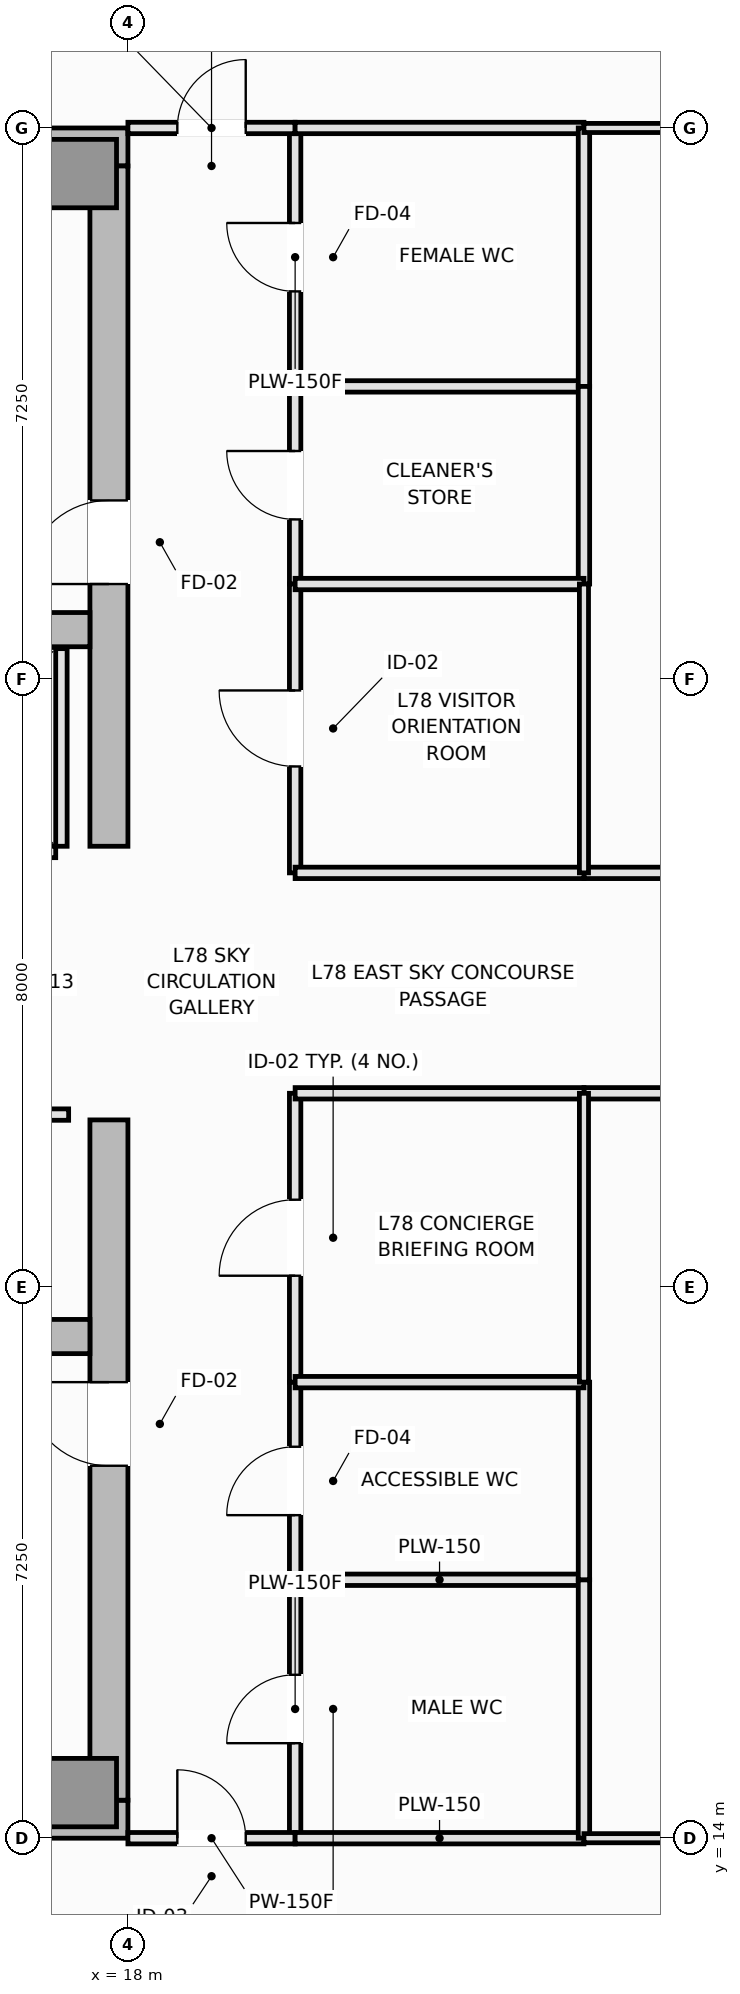
"""IFC4 building model, lengths in metres.
Left out: names, types, materials, properties, quantities, classifications, styles, units other than length and angle.
Written with IfcOpenShell. Run it as: python <this file> out.ifc"""

import sys

from ifc_helpers import new_model, si_unit, direction, frame, frame_2d, origin, origin_2d, place, context, subcontext, project, spatial, rectangle, extrude, element, fill, save


model = new_model("IFC4")
c1 = context("Model", 3, precision=1e-05, world=origin(), true_north=direction((0.0, 1.0)))
c2 = subcontext(c1, "Body", "Model", "MODEL_VIEW")
j1 = project(units=[si_unit("LENGTHUNIT", "METRE"), si_unit("PLANEANGLEUNIT", "RADIAN")], contexts=[c1])
p1 = place(None, origin())
s1 = spatial("IfcSite", under=j1, at=p1, CompositionType="ELEMENT")
p2 = place(p1, origin())
s2 = spatial("IfcBuilding", under=s1, at=p2, CompositionType="ELEMENT")
p3 = place(p2, frame((0.0, 0.0, 291.85)))
s3 = spatial("IfcBuildingStorey", under=s2, at=p3, CompositionType="ELEMENT", Elevation=291.85)
for number, where, z_axis, x_axis in (
    (1, (4.5, 14.25, 0.0), (0.0, 0.0, 1.0), (1.0, 0.0, 0.0)),
    (2, (4.5, 36.25, 0.0), (0.0, 0.0, 1.0), (1.0, 0.0, 0.0)),
):
    element("IfcWall", number, at=place(p3, frame(where, z_axis=z_axis, x_axis=x_axis)), inside=s3, PredefinedType="SHEAR", context=c2, shape_type="SweptSolid", body=[
        extrude(rectangle(XDim=13.5, YDim=0.5, at=frame_2d((6.75, 0.0))), origin(), (0.0, 0.0, 1.0), 4.8),
    ])
p4 = place(p3, frame((17.75, 14.5, 0.0), z_axis=(0.0, 0.0, 1.0), x_axis=(0.0, 1.0, 0.0)))
e3 = element("IfcWall", 3, at=p4, inside=s3, PredefinedType="SHEAR", context=c2, shape_type="SweptSolid", body=[
    extrude(rectangle(XDim=8.95, YDim=0.5, at=frame_2d((4.475, 0.0))), origin(), (0.0, 0.0, 1.0), 4.8),
])
p5 = place(p4, frame((4.4, 0.0, 0.0)))
e4 = element("IfcOpeningElement", 4, at=p5, cuts=e3, PredefinedType="OPENING", context=c2, shape_type="SweptSolid", body=[
    extrude(rectangle(XDim=1.1, YDim=2.15, at=frame_2d((0.55, 1.075))), frame((0.0, 0.26, 0.0), z_axis=(0.0, -1.0, 0.0), x_axis=(1.0, 0.0, 0.0)), (0.0, 0.0, 1.0), 0.52),
])
p6 = place(p3, frame((17.75, 27.05, 0.0), z_axis=(0.0, 0.0, 1.0), x_axis=(0.0, 1.0, 0.0)))
e5 = element("IfcWall", 5, at=p6, inside=s3, PredefinedType="SHEAR", context=c2, shape_type="SweptSolid", body=[
    extrude(rectangle(XDim=8.95, YDim=0.5, at=frame_2d((4.475, 0.0))), origin(), (0.0, 0.0, 1.0), 4.8),
])
p7 = place(p6, frame((3.45, 0.0, 0.0)))
e6 = element("IfcOpeningElement", 6, at=p7, cuts=e5, PredefinedType="OPENING", context=c2, shape_type="SweptSolid", body=[
    extrude(rectangle(XDim=1.1, YDim=2.15, at=frame_2d((0.55, 1.075))), frame((0.0, 0.26, 0.0), z_axis=(0.0, -1.0, 0.0), x_axis=(1.0, 0.0, 0.0)), (0.0, 0.0, 1.0), 0.52),
])
for number, where, z_axis, x_axis in (
    (7, (5.0, 20.6, 0.0), (0.0, 0.0, 1.0), (1.0, 0.0, 0.0)),
    (8, (5.0, 29.9, 0.0), (0.0, 0.0, 1.0), (1.0, 0.0, 0.0)),
):
    element("IfcWall", number, at=place(p3, frame(where, z_axis=z_axis, x_axis=x_axis)), inside=s3, PredefinedType="SHEAR", context=c2, shape_type="SweptSolid", body=[
        extrude(rectangle(XDim=12.5, YDim=0.45, at=frame_2d((6.25, 0.0))), origin(), (0.0, 0.0, 1.0), 4.8),
    ])
for number, where, z_axis, x_axis in (
    (9, (17.4, 14.6, 0.0), (0.0, 0.0, 1.0), (1.0, 0.0, 0.0)),
    (10, (17.4, 35.9, 0.0), (0.0, 0.0, 1.0), (1.0, 0.0, 0.0)),
):
    element("IfcColumn", number, at=place(p3, frame(where, z_axis=z_axis, x_axis=x_axis)), inside=s3, PredefinedType="PILASTER", context=c2, shape_type="SweptSolid", body=[
        extrude(rectangle(XDim=0.9, YDim=0.9, at=origin_2d()), origin(), (0.0, 0.0, 1.0), 4.8),
    ])
p8 = place(p3, frame((14.5, 26.975, 0.0), z_axis=(0.0, 0.0, 1.0), x_axis=(1.0, 0.0, 0.0)))
e11 = element("IfcWall", 11, at=p8, inside=s3, PredefinedType="PARTITIONING", context=c2, shape_type="SweptSolid", body=[
    extrude(rectangle(XDim=2.55, YDim=0.15, at=frame_2d((1.275, 0.0))), origin(), (0.0, 0.0, 1.0), 4.6),
])
p9 = place(p8, frame((0.625, 0.0, 0.0)))
e12 = element("IfcOpeningElement", 12, at=p9, cuts=e11, PredefinedType="OPENING", context=c2, shape_type="SweptSolid", body=[
    extrude(rectangle(XDim=1.3, YDim=2.2, at=frame_2d((0.65, 1.1))), frame((0.0, 0.085, 0.0), z_axis=(0.0, -1.0, 0.0), x_axis=(1.0, 0.0, 0.0)), (0.0, 0.0, 1.0), 0.17),
])
p10 = place(p3, frame((17.125, 27.05, 0.0), z_axis=(0.0, 0.0, 1.0), x_axis=(0.0, 1.0, 0.0)))
e13 = element("IfcWall", 13, at=p10, inside=s3, PredefinedType="PARTITIONING", context=c2, shape_type="SweptSolid", body=[
    extrude(rectangle(XDim=2.6, YDim=0.15, at=frame_2d((1.3, 0.0))), origin(), (0.0, 0.0, 1.0), 4.6),
])
p11 = place(p3, frame((14.33, 23.52, 0.0), z_axis=(0.0, 0.0, 1.0), x_axis=(1.0, 0.0, 0.0)))
e14 = element("IfcWall", 14, at=p11, inside=s3, PredefinedType="PARTITIONING", context=c2, shape_type="SweptSolid", body=[
    extrude(rectangle(XDim=2.89, YDim=0.15, at=frame_2d((1.445, 0.0))), origin(), (0.0, 0.0, 1.0), 4.6),
])
p12 = place(p11, frame((0.28, 0.0, 0.0)))
e15 = element("IfcOpeningElement", 15, at=p12, cuts=e14, PredefinedType="OPENING", context=c2, shape_type="SweptSolid", body=[
    extrude(rectangle(XDim=0.9, YDim=2.1, at=frame_2d((0.45, 1.05))), frame((0.0, 0.085, 0.0), z_axis=(0.0, -1.0, 0.0), x_axis=(1.0, 0.0, 0.0)), (0.0, 0.0, 1.0), 0.17),
])
p13 = place(p11, frame((1.71, 0.0, 0.0)))
e16 = element("IfcOpeningElement", 16, at=p13, cuts=e14, PredefinedType="OPENING", context=c2, shape_type="SweptSolid", body=[
    extrude(rectangle(XDim=0.9, YDim=2.1, at=frame_2d((0.45, 1.05))), frame((0.0, 0.085, 0.0), z_axis=(0.0, -1.0, 0.0), x_axis=(1.0, 0.0, 0.0)), (0.0, 0.0, 1.0), 0.17),
])
p14 = place(p3, frame((20.2, 14.0, 0.0), z_axis=(0.0, 0.0, 1.0), x_axis=(0.0, 1.0, 0.0)))
e17 = element("IfcWall", 17, at=p14, inside=s3, PredefinedType="PLUMBINGWALL", context=c2, shape_type="SweptSolid", body=[
    extrude(rectangle(XDim=3.4, YDim=0.15, at=frame_2d((1.7, 0.0))), origin(), (0.0, 0.0, 1.0), 4.6),
])
p15 = place(p14, frame((1.25, 0.0, 0.0)))
e18 = element("IfcOpeningElement", 18, at=p15, cuts=e17, PredefinedType="OPENING", context=c2, shape_type="SweptSolid", body=[
    extrude(rectangle(XDim=0.9, YDim=2.1, at=frame_2d((0.45, 1.05))), frame((0.0, 0.085, 0.0), z_axis=(0.0, -1.0, 0.0), x_axis=(1.0, 0.0, 0.0)), (0.0, 0.0, 1.0), 0.17),
])
p16 = place(p3, frame((20.2, 33.1, 0.0), z_axis=(0.0, 0.0, 1.0), x_axis=(0.0, 1.0, 0.0)))
e19 = element("IfcWall", 19, at=p16, inside=s3, PredefinedType="PLUMBINGWALL", context=c2, shape_type="SweptSolid", body=[
    extrude(rectangle(XDim=3.4, YDim=0.15, at=frame_2d((1.7, 0.0))), origin(), (0.0, 0.0, 1.0), 4.6),
])
p17 = place(p16, frame((1.25, 0.0, 0.0)))
e20 = element("IfcOpeningElement", 20, at=p17, cuts=e19, PredefinedType="OPENING", context=c2, shape_type="SweptSolid", body=[
    extrude(rectangle(XDim=0.9, YDim=2.1, at=frame_2d((0.45, 1.05))), frame((0.0, 0.085, 0.0), z_axis=(0.0, -1.0, 0.0), x_axis=(1.0, 0.0, 0.0)), (0.0, 0.0, 1.0), 0.17),
])
p18 = place(p3, frame((20.2, 17.4, 0.0), z_axis=(0.0, 0.0, 1.0), x_axis=(0.0, 1.0, 0.0)))
e21 = element("IfcWall", 21, at=p18, inside=s3, PredefinedType="PLUMBINGWALL", context=c2, shape_type="SweptSolid", body=[
    extrude(rectangle(XDim=2.6, YDim=0.15, at=frame_2d((1.3, 0.0))), origin(), (0.0, 0.0, 1.0), 4.6),
])
p19 = place(p18, frame((0.85, 0.0, 0.0)))
e22 = element("IfcOpeningElement", 22, at=p19, cuts=e21, PredefinedType="OPENING", context=c2, shape_type="SweptSolid", body=[
    extrude(rectangle(XDim=0.9, YDim=2.1, at=frame_2d((0.45, 1.05))), frame((0.0, 0.085, 0.0), z_axis=(0.0, -1.0, 0.0), x_axis=(1.0, 0.0, 0.0)), (0.0, 0.0, 1.0), 0.17),
])
p20 = place(p3, frame((20.2, 30.5, 0.0), z_axis=(0.0, 0.0, 1.0), x_axis=(0.0, 1.0, 0.0)))
e23 = element("IfcWall", 23, at=p20, inside=s3, PredefinedType="PLUMBINGWALL", context=c2, shape_type="SweptSolid", body=[
    extrude(rectangle(XDim=2.6, YDim=0.15, at=frame_2d((1.3, 0.0))), origin(), (0.0, 0.0, 1.0), 4.6),
])
p21 = place(p20, frame((0.85, 0.0, 0.0)))
e24 = element("IfcOpeningElement", 24, at=p21, cuts=e23, PredefinedType="OPENING", context=c2, shape_type="SweptSolid", body=[
    extrude(rectangle(XDim=0.9, YDim=2.1, at=frame_2d((0.45, 1.05))), frame((0.0, 0.085, 0.0), z_axis=(0.0, -1.0, 0.0), x_axis=(1.0, 0.0, 0.0)), (0.0, 0.0, 1.0), 0.17),
])
p22 = place(p3, frame((18.0, 14.0, 0.0), z_axis=(0.0, 0.0, 1.0), x_axis=(1.0, 0.0, 0.0)))
e25 = element("IfcWall", 25, at=p22, inside=s3, PredefinedType="PARTITIONING", context=c2, shape_type="SweptSolid", body=[
    extrude(rectangle(XDim=2.2, YDim=0.15, at=frame_2d((1.1, 0.0))), origin(), (0.0, 0.0, 1.0), 4.6),
])
p23 = place(p22, frame((0.65, 0.0, 0.0)))
e26 = element("IfcOpeningElement", 26, at=p23, cuts=e25, PredefinedType="OPENING", context=c2, shape_type="SweptSolid", body=[
    extrude(rectangle(XDim=0.9, YDim=2.1, at=frame_2d((0.45, 1.05))), frame((0.0, 0.085, 0.0), z_axis=(0.0, -1.0, 0.0), x_axis=(1.0, 0.0, 0.0)), (0.0, 0.0, 1.0), 0.17),
])
p24 = place(p3, frame((18.0, 36.5, 0.0), z_axis=(0.0, 0.0, 1.0), x_axis=(1.0, 0.0, 0.0)))
e27 = element("IfcWall", 27, at=p24, inside=s3, PredefinedType="PARTITIONING", context=c2, shape_type="SweptSolid", body=[
    extrude(rectangle(XDim=2.2, YDim=0.15, at=frame_2d((1.1, 0.0))), origin(), (0.0, 0.0, 1.0), 4.6),
])
p25 = place(p24, frame((0.65, 0.0, 0.0)))
e28 = element("IfcOpeningElement", 28, at=p25, cuts=e27, PredefinedType="OPENING", context=c2, shape_type="SweptSolid", body=[
    extrude(rectangle(XDim=0.9, YDim=2.1, at=frame_2d((0.45, 1.05))), frame((0.0, 0.085, 0.0), z_axis=(0.0, -1.0, 0.0), x_axis=(1.0, 0.0, 0.0)), (0.0, 0.0, 1.0), 0.17),
])
p26 = place(p3, frame((20.2, 20.0, 0.0), z_axis=(0.0, 0.0, 1.0), x_axis=(0.0, 1.0, 0.0)))
e29 = element("IfcWall", 29, at=p26, inside=s3, PredefinedType="PARTITIONING", context=c2, shape_type="SweptSolid", body=[
    extrude(rectangle(XDim=3.8, YDim=0.15, at=frame_2d((1.9, 0.0))), origin(), (0.0, 0.0, 1.0), 4.6),
])
p27 = place(p26, frame((1.4, 0.0, 0.0)))
e30 = element("IfcOpeningElement", 30, at=p27, cuts=e29, PredefinedType="OPENING", context=c2, shape_type="SweptSolid", body=[
    extrude(rectangle(XDim=1.0, YDim=2.15, at=frame_2d((0.5, 1.075))), frame((0.0, 0.085, 0.0), z_axis=(0.0, -1.0, 0.0), x_axis=(1.0, 0.0, 0.0)), (0.0, 0.0, 1.0), 0.17),
])
p28 = place(p3, frame((20.2, 26.7, 0.0), z_axis=(0.0, 0.0, 1.0), x_axis=(0.0, 1.0, 0.0)))
e31 = element("IfcWall", 31, at=p28, inside=s3, PredefinedType="PARTITIONING", context=c2, shape_type="SweptSolid", body=[
    extrude(rectangle(XDim=3.8, YDim=0.15, at=frame_2d((1.9, 0.0))), origin(), (0.0, 0.0, 1.0), 4.6),
])
p29 = place(p28, frame((1.4, 0.0, 0.0)))
e32 = element("IfcOpeningElement", 32, at=p29, cuts=e31, PredefinedType="OPENING", context=c2, shape_type="SweptSolid", body=[
    extrude(rectangle(XDim=1.0, YDim=2.15, at=frame_2d((0.5, 1.075))), frame((0.0, 0.085, 0.0), z_axis=(0.0, -1.0, 0.0), x_axis=(1.0, 0.0, 0.0)), (0.0, 0.0, 1.0), 0.17),
])
p30 = place(p3, frame((24.0, 23.8, 0.0), z_axis=(0.0, 0.0, 1.0), x_axis=(1.0, 0.0, 0.0)))
e33 = element("IfcWall", 33, at=p30, inside=s3, PredefinedType="PARTITIONING", context=c2, shape_type="SweptSolid", body=[
    extrude(rectangle(XDim=10.5, YDim=0.15, at=frame_2d((5.25, 0.0))), origin(), (0.0, 0.0, 1.0), 4.6),
])
p31 = place(p30, frame((4.75, 0.0, 0.0)))
e34 = element("IfcOpeningElement", 34, at=p31, cuts=e33, PredefinedType="OPENING", context=c2, shape_type="SweptSolid", body=[
    extrude(rectangle(XDim=1.0, YDim=2.15, at=frame_2d((0.5, 1.075))), frame((0.0, 0.085, 0.0), z_axis=(0.0, -1.0, 0.0), x_axis=(1.0, 0.0, 0.0)), (0.0, 0.0, 1.0), 0.17),
])
p32 = place(p3, frame((24.0, 26.7, 0.0), z_axis=(0.0, 0.0, 1.0), x_axis=(1.0, 0.0, 0.0)))
e35 = element("IfcWall", 35, at=p32, inside=s3, PredefinedType="PARTITIONING", context=c2, shape_type="SweptSolid", body=[
    extrude(rectangle(XDim=10.5, YDim=0.15, at=frame_2d((5.25, 0.0))), origin(), (0.0, 0.0, 1.0), 4.6),
])
p33 = place(p32, frame((4.75, 0.0, 0.0)))
e36 = element("IfcOpeningElement", 36, at=p33, cuts=e35, PredefinedType="OPENING", context=c2, shape_type="SweptSolid", body=[
    extrude(rectangle(XDim=1.0, YDim=2.15, at=frame_2d((0.5, 1.075))), frame((0.0, 0.085, 0.0), z_axis=(0.0, -1.0, 0.0), x_axis=(1.0, 0.0, 0.0)), (0.0, 0.0, 1.0), 0.17),
])
for number, where, z_axis, x_axis in (
    (37, (20.2, 23.8, 0.0), (0.0, 0.0, 1.0), (1.0, 0.0, 0.0)),
    (38, (20.2, 26.7, 0.0), (0.0, 0.0, 1.0), (1.0, 0.0, 0.0)),
):
    element("IfcWall", number, at=place(p3, frame(where, z_axis=z_axis, x_axis=x_axis)), inside=s3, PredefinedType="PARTITIONING", context=c2, shape_type="SweptSolid", body=[
        extrude(rectangle(XDim=3.8, YDim=0.15, at=frame_2d((1.9, 0.0))), origin(), (0.0, 0.0, 1.0), 4.6),
    ])
for number, where, z_axis, x_axis in (
    (39, (20.2, 17.4, 0.0), (0.0, 0.0, 1.0), (1.0, 0.0, 0.0)),
    (40, (20.2, 14.0, 0.0), (0.0, 0.0, 1.0), (1.0, 0.0, 0.0)),
):
    element("IfcWall", number, at=place(p3, frame(where, z_axis=z_axis, x_axis=x_axis)), inside=s3, PredefinedType="PLUMBINGWALL", context=c2, shape_type="SweptSolid", body=[
        extrude(rectangle(XDim=3.8, YDim=0.15, at=frame_2d((1.9, 0.0))), origin(), (0.0, 0.0, 1.0), 4.6),
    ])
p34 = place(p3, frame((24.0, 14.0, 0.0), z_axis=(0.0, 0.0, 1.0), x_axis=(0.0, 1.0, 0.0)))
e41 = element("IfcWall", 41, at=p34, inside=s3, PredefinedType="PLUMBINGWALL", context=c2, shape_type="SweptSolid", body=[
    extrude(rectangle(XDim=3.4, YDim=0.15, at=frame_2d((1.7, 0.0))), origin(), (0.0, 0.0, 1.0), 4.15),
])
for number, where, z_axis, x_axis in (
    (42, (20.2, 33.1, 0.0), (0.0, 0.0, 1.0), (1.0, 0.0, 0.0)),
    (43, (20.2, 36.5, 0.0), (0.0, 0.0, 1.0), (1.0, 0.0, 0.0)),
):
    element("IfcWall", number, at=place(p3, frame(where, z_axis=z_axis, x_axis=x_axis)), inside=s3, PredefinedType="PLUMBINGWALL", context=c2, shape_type="SweptSolid", body=[
        extrude(rectangle(XDim=3.8, YDim=0.15, at=frame_2d((1.9, 0.0))), origin(), (0.0, 0.0, 1.0), 4.6),
    ])
p35 = place(p3, frame((24.0, 33.1, 0.0), z_axis=(0.0, 0.0, 1.0), x_axis=(0.0, 1.0, 0.0)))
e44 = element("IfcWall", 44, at=p35, inside=s3, PredefinedType="PLUMBINGWALL", context=c2, shape_type="SweptSolid", body=[
    extrude(rectangle(XDim=3.4, YDim=0.15, at=frame_2d((1.7, 0.0))), origin(), (0.0, 0.0, 1.0), 4.15),
])
p36 = place(p3, frame((24.0, 17.4, 0.0), z_axis=(0.0, 0.0, 1.0), x_axis=(0.0, 1.0, 0.0)))
e45 = element("IfcWall", 45, at=p36, inside=s3, PredefinedType="PLUMBINGWALL", context=c2, shape_type="SweptSolid", body=[
    extrude(rectangle(XDim=2.6, YDim=0.15, at=frame_2d((1.3, 0.0))), origin(), (0.0, 0.0, 1.0), 4.15),
])
p37 = place(p3, frame((20.2, 20.0, 0.0), z_axis=(0.0, 0.0, 1.0), x_axis=(1.0, 0.0, 0.0)))
e46 = element("IfcWall", 46, at=p37, inside=s3, PredefinedType="PLUMBINGWALL", context=c2, shape_type="SweptSolid", body=[
    extrude(rectangle(XDim=3.8, YDim=0.15, at=frame_2d((1.9, 0.0))), origin(), (0.0, 0.0, 1.0), 4.6),
])
p38 = place(p3, frame((24.0, 30.5, 0.0), z_axis=(0.0, 0.0, 1.0), x_axis=(0.0, 1.0, 0.0)))
e47 = element("IfcWall", 47, at=p38, inside=s3, PredefinedType="PLUMBINGWALL", context=c2, shape_type="SweptSolid", body=[
    extrude(rectangle(XDim=2.6, YDim=0.15, at=frame_2d((1.3, 0.0))), origin(), (0.0, 0.0, 1.0), 4.15),
])
p39 = place(p3, frame((20.2, 30.5, 0.0), z_axis=(0.0, 0.0, 1.0), x_axis=(1.0, 0.0, 0.0)))
e48 = element("IfcWall", 48, at=p39, inside=s3, PredefinedType="PLUMBINGWALL", context=c2, shape_type="SweptSolid", body=[
    extrude(rectangle(XDim=3.8, YDim=0.15, at=frame_2d((1.9, 0.0))), origin(), (0.0, 0.0, 1.0), 4.6),
])
for number, where, z_axis, x_axis in (
    (49, (24.0, 14.0, 0.0), (0.0, 0.0, 1.0), (1.0, 0.0, 0.0)),
    (50, (24.0, 36.5, 0.0), (0.0, 0.0, 1.0), (1.0, 0.0, 0.0)),
):
    element("IfcWall", number, at=place(p3, frame(where, z_axis=z_axis, x_axis=x_axis)), inside=s3, PredefinedType="PARTITIONING", context=c2, shape_type="SweptSolid", body=[
        extrude(rectangle(XDim=10.5, YDim=0.12, at=frame_2d((5.25, 0.0))), origin(), (0.0, 0.0, 1.0), 4.6),
    ])
for number, where, z_axis, x_axis in (
    (51, (24.0, 20.0, 0.0), (0.0, 0.0, 1.0), (0.0, 1.0, 0.0)),
    (52, (24.0, 26.7, 0.0), (0.0, 0.0, 1.0), (0.0, 1.0, 0.0)),
):
    element("IfcWall", number, at=place(p3, frame(where, z_axis=z_axis, x_axis=x_axis)), inside=s3, PredefinedType="PARTITIONING", context=c2, shape_type="SweptSolid", body=[
        extrude(rectangle(XDim=3.8, YDim=0.12, at=frame_2d((1.9, 0.0))), origin(), (0.0, 0.0, 1.0), 4.15),
    ])
p40 = place(p5, origin())
e53 = element("IfcDoor", 53, at=p40, inside=s3, OperationType="SINGLE_SWING_RIGHT", PredefinedType="DOOR", context=c2, shape_type="SweptSolid", body=[
    extrude(rectangle(XDim=1.1, YDim=2.15, at=frame_2d((0.55, 1.075))), frame((0.0, 0.025, 0.0), z_axis=(0.0, -1.0, 0.0), x_axis=(1.0, 0.0, 0.0)), (0.0, 0.0, 1.0), 0.05),
])
fill(e4, e53)
p41 = place(p7, origin())
e54 = element("IfcDoor", 54, at=p41, inside=s3, OperationType="SINGLE_SWING_LEFT", PredefinedType="DOOR", context=c2, shape_type="SweptSolid", body=[
    extrude(rectangle(XDim=1.1, YDim=2.15, at=frame_2d((0.55, 1.075))), frame((0.0, 0.025, 0.0), z_axis=(0.0, -1.0, 0.0), x_axis=(1.0, 0.0, 0.0)), (0.0, 0.0, 1.0), 0.05),
])
fill(e6, e54)
p42 = place(p15, origin())
e55 = element("IfcDoor", 55, at=p42, inside=s3, OperationType="SINGLE_SWING_LEFT", PredefinedType="DOOR", context=c2, shape_type="SweptSolid", body=[
    extrude(rectangle(XDim=0.9, YDim=2.1, at=frame_2d((0.45, 1.05))), frame((0.0, 0.025, 0.0), z_axis=(0.0, -1.0, 0.0), x_axis=(1.0, 0.0, 0.0)), (0.0, 0.0, 1.0), 0.05),
])
fill(e18, e55)
p43 = place(p17, origin())
e56 = element("IfcDoor", 56, at=p43, inside=s3, OperationType="SINGLE_SWING_RIGHT", PredefinedType="DOOR", context=c2, shape_type="SweptSolid", body=[
    extrude(rectangle(XDim=0.9, YDim=2.1, at=frame_2d((0.45, 1.05))), frame((0.0, 0.025, 0.0), z_axis=(0.0, -1.0, 0.0), x_axis=(1.0, 0.0, 0.0)), (0.0, 0.0, 1.0), 0.05),
])
fill(e20, e56)
p44 = place(p19, origin())
e57 = element("IfcDoor", 57, at=p44, inside=s3, OperationType="SINGLE_SWING_LEFT", PredefinedType="DOOR", context=c2, shape_type="SweptSolid", body=[
    extrude(rectangle(XDim=0.9, YDim=2.1, at=frame_2d((0.45, 1.05))), frame((0.0, 0.025, 0.0), z_axis=(0.0, -1.0, 0.0), x_axis=(1.0, 0.0, 0.0)), (0.0, 0.0, 1.0), 0.05),
])
fill(e22, e57)
p45 = place(p21, origin())
e58 = element("IfcDoor", 58, at=p45, inside=s3, OperationType="SINGLE_SWING_RIGHT", PredefinedType="DOOR", context=c2, shape_type="SweptSolid", body=[
    extrude(rectangle(XDim=0.9, YDim=2.1, at=frame_2d((0.45, 1.05))), frame((0.0, 0.025, 0.0), z_axis=(0.0, -1.0, 0.0), x_axis=(1.0, 0.0, 0.0)), (0.0, 0.0, 1.0), 0.05),
])
fill(e24, e58)
p46 = place(p23, origin())
e59 = element("IfcDoor", 59, at=p46, inside=s3, OperationType="SINGLE_SWING_LEFT", PredefinedType="DOOR", context=c2, shape_type="SweptSolid", body=[
    extrude(rectangle(XDim=0.9, YDim=2.1, at=frame_2d((0.45, 1.05))), frame((0.0, 0.025, 0.0), z_axis=(0.0, -1.0, 0.0), x_axis=(1.0, 0.0, 0.0)), (0.0, 0.0, 1.0), 0.05),
])
fill(e26, e59)
p47 = place(p25, origin())
e60 = element("IfcDoor", 60, at=p47, inside=s3, OperationType="SINGLE_SWING_RIGHT", PredefinedType="DOOR", context=c2, shape_type="SweptSolid", body=[
    extrude(rectangle(XDim=0.9, YDim=2.1, at=frame_2d((0.45, 1.05))), frame((0.0, 0.025, 0.0), z_axis=(0.0, -1.0, 0.0), x_axis=(1.0, 0.0, 0.0)), (0.0, 0.0, 1.0), 0.05),
])
fill(e28, e60)
p48 = place(p27, origin())
e61 = element("IfcDoor", 61, at=p48, inside=s3, OperationType="SINGLE_SWING_LEFT", PredefinedType="DOOR", context=c2, shape_type="SweptSolid", body=[
    extrude(rectangle(XDim=1.0, YDim=2.15, at=frame_2d((0.5, 1.075))), frame((0.0, 0.025, 0.0), z_axis=(0.0, -1.0, 0.0), x_axis=(1.0, 0.0, 0.0)), (0.0, 0.0, 1.0), 0.05),
])
fill(e30, e61)
p49 = place(p29, origin())
e62 = element("IfcDoor", 62, at=p49, inside=s3, OperationType="SINGLE_SWING_RIGHT", PredefinedType="DOOR", context=c2, shape_type="SweptSolid", body=[
    extrude(rectangle(XDim=1.0, YDim=2.15, at=frame_2d((0.5, 1.075))), frame((0.0, 0.025, 0.0), z_axis=(0.0, -1.0, 0.0), x_axis=(1.0, 0.0, 0.0)), (0.0, 0.0, 1.0), 0.05),
])
fill(e32, e62)
save(model, sys.argv[1])
